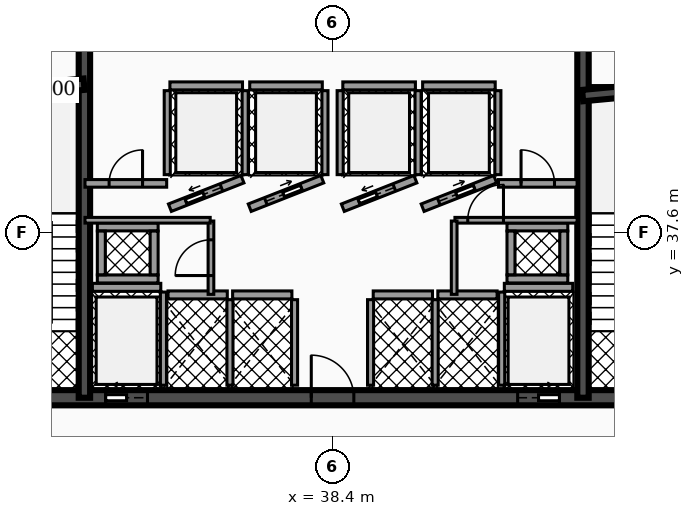
"""IFC4 building model, lengths in metres.
Left out: names, types, materials, properties, quantities, classifications, styles, units other than length and angle.
Written with IfcOpenShell. Run it as: python <this file> out.ifc"""

import sys

from ifc_helpers import new_model, si_unit, direction, frame, frame_2d, origin, place, context, subcontext, project, spatial, rectangle, extrude, element, fill, save


model = new_model("IFC4")
c1 = context("Model", 3, precision=1e-05, world=origin(), true_north=direction((0.0, 1.0)))
c2 = subcontext(c1, "Body", "Model", "MODEL_VIEW")
j1 = project(units=[si_unit("LENGTHUNIT", "METRE"), si_unit("PLANEANGLEUNIT", "RADIAN")], contexts=[c1])
p1 = place(None, origin())
s1 = spatial("IfcSite", under=j1, at=p1, CompositionType="ELEMENT")
p2 = place(p1, origin())
s2 = spatial("IfcBuilding", under=s1, at=p2, CompositionType="ELEMENT")
p3 = place(p2, frame((0.0, 0.0, 47.94)))
s3 = spatial("IfcBuildingStorey", under=s2, at=p3, CompositionType="ELEMENT", Elevation=47.94)
p4 = place(p3, frame((28.4, 33.25, 0.0), z_axis=(0.0, 0.0, 1.0), x_axis=(1.0, 0.0, 0.0)))
e1 = element("IfcWall", 1, at=p4, inside=s3, PredefinedType="SHEAR", context=c2, shape_type="SweptSolid", body=[
    extrude(rectangle(XDim=20.06, YDim=0.4, at=frame_2d((10.03, 0.0))), origin(), (0.0, 0.0, 1.0), 3.82),
])
p5 = place(p4, frame((4.03, 0.0, 0.0)))
e2 = element("IfcOpeningElement", 2, at=p5, cuts=e1, PredefinedType="OPENING", context=c2, shape_type="SweptSolid", body=[
    extrude(rectangle(XDim=1.1, YDim=2.15, at=frame_2d((0.55, 1.075))), frame((0.0, 0.21, 0.0), z_axis=(0.0, -1.0, 0.0), x_axis=(1.0, 0.0, 0.0)), (0.0, 0.0, 1.0), 0.42),
])
p6 = place(p4, frame((14.87, 0.0, 0.0)))
e3 = element("IfcOpeningElement", 3, at=p6, cuts=e1, PredefinedType="OPENING", context=c2, shape_type="SweptSolid", body=[
    extrude(rectangle(XDim=1.1, YDim=2.15, at=frame_2d((0.55, 1.075))), frame((0.0, 0.21, 0.0), z_axis=(0.0, -1.0, 0.0), x_axis=(1.0, 0.0, 0.0)), (0.0, 0.0, 1.0), 0.42),
])
p7 = place(p4, frame((1.31, 0.0, 0.0)))
e4 = element("IfcOpeningElement", 4, at=p7, cuts=e1, PredefinedType="OPENING", context=c2, shape_type="SweptSolid", body=[
    extrude(rectangle(XDim=1.1, YDim=2.2, at=frame_2d((0.55, 1.1))), frame((0.0, 0.21, 0.0), z_axis=(0.0, -1.0, 0.0), x_axis=(1.0, 0.0, 0.0)), (0.0, 0.0, 1.0), 0.42),
])
p8 = place(p4, frame((9.44, 0.0, 0.0)))
e5 = element("IfcOpeningElement", 5, at=p8, cuts=e1, PredefinedType="OPENING", context=c2, shape_type="SweptSolid", body=[
    extrude(rectangle(XDim=1.12, YDim=2.05, at=frame_2d((0.56, 1.025))), frame((0.0, 0.21, 0.0), z_axis=(0.0, -1.0, 0.0), x_axis=(1.0, 0.0, 0.0)), (0.0, 0.0, 1.0), 0.42),
])
p9 = place(p4, frame((17.65, 0.0, 0.0)))
e6 = element("IfcOpeningElement", 6, at=p9, cuts=e1, PredefinedType="OPENING", context=c2, shape_type="SweptSolid", body=[
    extrude(rectangle(XDim=1.1, YDim=2.2, at=frame_2d((0.55, 1.1))), frame((0.0, 0.21, 0.0), z_axis=(0.0, -1.0, 0.0), x_axis=(1.0, 0.0, 0.0)), (0.0, 0.0, 1.0), 0.42),
])
for number, where, z_axis, x_axis in (
    (7, (31.87, 33.25, 0.0), (0.0, 0.0, 1.0), (0.0, 1.0, 0.0)),
    (8, (44.99, 33.25, 0.0), (0.0, 0.0, 1.0), (0.0, 1.0, 0.0)),
):
    element("IfcWall", number, at=place(p3, frame(where, z_axis=z_axis, x_axis=x_axis)), inside=s3, PredefinedType="SHEAR", context=c2, shape_type="SweptSolid", body=[
        extrude(rectangle(XDim=10.2, YDim=0.3, at=frame_2d((5.1, 0.0))), origin(), (0.0, 0.0, 1.0), 3.82),
    ])
p10 = place(p3, frame((28.64, 41.2, 0.0), z_axis=(0.0, 0.0, 1.0), x_axis=(0.995687118776, 0.092774789157, 0.0)))
e9 = element("IfcWall", 9, at=p10, inside=s3, PredefinedType="SHEAR", context=c2, shape_type="SweptSolid", body=[
    extrude(rectangle(XDim=3.234, YDim=0.3, at=frame_2d((1.617, 0.0))), origin(), (0.0, 0.0, 1.0), 3.82),
])
p11 = place(p3, frame((44.98, 41.2, 0.0), z_axis=(0.0, 0.0, 1.0), x_axis=(0.995686468965, 0.09278176286, 0.0)))
e10 = element("IfcWall", 10, at=p11, inside=s3, PredefinedType="SHEAR", context=c2, shape_type="SweptSolid", body=[
    extrude(rectangle(XDim=3.234, YDim=0.3, at=frame_2d((1.617, 0.0))), origin(), (0.0, 0.0, 1.0), 3.82),
])
p12 = place(p3, frame((32.08, 36.155, 0.0), z_axis=(0.0, 0.0, 1.0), x_axis=(1.0, 0.0, 0.0)))
e11 = element("IfcWall", 11, at=p12, inside=s3, PredefinedType="SOLIDWALL", context=c2, shape_type="SweptSolid", body=[
    extrude(rectangle(XDim=1.8, YDim=0.21, at=frame_2d((0.9, 0.0))), origin(), (0.0, 0.0, 1.0), 2.792),
])
p13 = place(p3, frame((33.95, 33.58, 0.0), z_axis=(0.0, 0.0, 1.0), x_axis=(0.0, 1.0, 0.0)))
e12 = element("IfcWall", 12, at=p13, inside=s3, PredefinedType="SOLIDWALL", context=c2, shape_type="SweptSolid", body=[
    extrude(rectangle(XDim=2.45, YDim=0.16, at=frame_2d((1.225, 0.0))), origin(), (0.0, 0.0, 1.0), 2.792),
])
p14 = place(p3, frame((42.92, 36.155, 0.0), z_axis=(0.0, 0.0, 1.0), x_axis=(1.0, 0.0, 0.0)))
e13 = element("IfcWall", 13, at=p14, inside=s3, PredefinedType="SOLIDWALL", context=c2, shape_type="SweptSolid", body=[
    extrude(rectangle(XDim=1.8, YDim=0.21, at=frame_2d((0.9, 0.0))), origin(), (0.0, 0.0, 1.0), 2.792),
])
p15 = place(p3, frame((42.85, 33.58, 0.0), z_axis=(0.0, 0.0, 1.0), x_axis=(0.0, 1.0, 0.0)))
e14 = element("IfcWall", 14, at=p15, inside=s3, PredefinedType="SOLIDWALL", context=c2, shape_type="SweptSolid", body=[
    extrude(rectangle(XDim=2.45, YDim=0.16, at=frame_2d((1.225, 0.0))), origin(), (0.0, 0.0, 1.0), 2.792),
])
p16 = place(p3, frame((34.12, 38.25, 0.0), z_axis=(0.0, 0.0, 1.0), x_axis=(0.930804993012, 0.36551616241, 0.0)))
e15 = element("IfcWall", 15, at=p16, inside=s3, PredefinedType="SOLIDWALL", context=c2, shape_type="SweptSolid", body=[
    extrude(rectangle(XDim=2.052, YDim=0.21, at=frame_2d((1.026, 0.0))), origin(), (0.0, 0.0, 1.0), 2.792),
])
p17 = place(p16, frame((0.455, 0.0, 0.0)))
e16 = element("IfcOpeningElement", 16, at=p17, cuts=e15, PredefinedType="OPENING", context=c2, shape_type="SweptSolid", body=[
    extrude(rectangle(XDim=1.0, YDim=2.1, at=frame_2d((0.5, 1.05))), frame((0.0, 0.115, 0.0), z_axis=(0.0, -1.0, 0.0), x_axis=(1.0, 0.0, 0.0)), (0.0, 0.0, 1.0), 0.23),
])
p18 = place(p3, frame((34.12, 41.455, 0.0), z_axis=(0.0, 0.0, 1.0), x_axis=(1.0, 0.0, 0.0)))
e17 = element("IfcWall", 17, at=p18, inside=s3, PredefinedType="SOLIDWALL", context=c2, shape_type="SweptSolid", body=[
    extrude(rectangle(XDim=1.91, YDim=0.21, at=frame_2d((0.955, 0.0))), origin(), (0.0, 0.0, 1.0), 2.792),
])
for number, where, z_axis, x_axis in (
    (18, (34.05, 39.12, 0.0), (0.0, 0.0, 1.0), (0.0, 1.0, 0.0)),
    (19, (36.1, 39.12, 0.0), (0.0, 0.0, 1.0), (0.0, 1.0, 0.0)),
):
    element("IfcWall", number, at=place(p3, frame(where, z_axis=z_axis, x_axis=x_axis)), inside=s3, PredefinedType="SOLIDWALL", context=c2, shape_type="SweptSolid", body=[
        extrude(rectangle(XDim=2.21, YDim=0.16, at=frame_2d((1.105, 0.0))), origin(), (0.0, 0.0, 1.0), 2.792),
    ])
p19 = place(p3, frame((36.22, 38.25, 0.0), z_axis=(0.0, 0.0, 1.0), x_axis=(0.930804993012, 0.36551616241, 0.0)))
e20 = element("IfcWall", 20, at=p19, inside=s3, PredefinedType="SOLIDWALL", context=c2, shape_type="SweptSolid", body=[
    extrude(rectangle(XDim=2.052, YDim=0.21, at=frame_2d((1.026, 0.0))), origin(), (0.0, 0.0, 1.0), 2.792),
])
p20 = place(p19, frame((0.455, 0.0, 0.0)))
e21 = element("IfcOpeningElement", 21, at=p20, cuts=e20, PredefinedType="OPENING", context=c2, shape_type="SweptSolid", body=[
    extrude(rectangle(XDim=1.0, YDim=2.1, at=frame_2d((0.5, 1.05))), frame((0.0, 0.115, 0.0), z_axis=(0.0, -1.0, 0.0), x_axis=(1.0, 0.0, 0.0)), (0.0, 0.0, 1.0), 0.23),
])
p21 = place(p3, frame((36.22, 41.455, 0.0), z_axis=(0.0, 0.0, 1.0), x_axis=(1.0, 0.0, 0.0)))
e22 = element("IfcWall", 22, at=p21, inside=s3, PredefinedType="SOLIDWALL", context=c2, shape_type="SweptSolid", body=[
    extrude(rectangle(XDim=1.91, YDim=0.21, at=frame_2d((0.955, 0.0))), origin(), (0.0, 0.0, 1.0), 2.792),
])
p22 = place(p3, frame((38.2, 39.12, 0.0), z_axis=(0.0, 0.0, 1.0), x_axis=(0.0, 1.0, 0.0)))
e23 = element("IfcWall", 23, at=p22, inside=s3, PredefinedType="SOLIDWALL", context=c2, shape_type="SweptSolid", body=[
    extrude(rectangle(XDim=2.21, YDim=0.16, at=frame_2d((1.105, 0.0))), origin(), (0.0, 0.0, 1.0), 2.792),
])
p23 = place(p3, frame((38.67, 38.25, 0.0), z_axis=(0.0, 0.0, 1.0), x_axis=(0.930820886763, 0.3654756856, 0.0)))
e24 = element("IfcWall", 24, at=p23, inside=s3, PredefinedType="SOLIDWALL", context=c2, shape_type="SweptSolid", body=[
    extrude(rectangle(XDim=2.052, YDim=0.21, at=frame_2d((1.026, 0.0))), origin(), (0.0, 0.0, 1.0), 2.792),
])
p24 = place(p23, frame((0.455, 0.0, 0.0)))
e25 = element("IfcOpeningElement", 25, at=p24, cuts=e24, PredefinedType="OPENING", context=c2, shape_type="SweptSolid", body=[
    extrude(rectangle(XDim=1.0, YDim=2.1, at=frame_2d((0.5, 1.05))), frame((0.0, 0.115, 0.0), z_axis=(0.0, -1.0, 0.0), x_axis=(1.0, 0.0, 0.0)), (0.0, 0.0, 1.0), 0.23),
])
p25 = place(p3, frame((38.67, 41.455, 0.0), z_axis=(0.0, 0.0, 1.0), x_axis=(1.0, 0.0, 0.0)))
e26 = element("IfcWall", 26, at=p25, inside=s3, PredefinedType="SOLIDWALL", context=c2, shape_type="SweptSolid", body=[
    extrude(rectangle(XDim=1.91, YDim=0.21, at=frame_2d((0.955, 0.0))), origin(), (0.0, 0.0, 1.0), 2.792),
])
for number, where, z_axis, x_axis in (
    (27, (38.6, 39.12, 0.0), (0.0, 0.0, 1.0), (0.0, 1.0, 0.0)),
    (28, (40.65, 39.12, 0.0), (0.0, 0.0, 1.0), (0.0, 1.0, 0.0)),
):
    element("IfcWall", number, at=place(p3, frame(where, z_axis=z_axis, x_axis=x_axis)), inside=s3, PredefinedType="SOLIDWALL", context=c2, shape_type="SweptSolid", body=[
        extrude(rectangle(XDim=2.21, YDim=0.16, at=frame_2d((1.105, 0.0))), origin(), (0.0, 0.0, 1.0), 2.792),
    ])
p26 = place(p3, frame((40.77, 38.25, 0.0), z_axis=(0.0, 0.0, 1.0), x_axis=(0.930804993012, 0.36551616241, 0.0)))
e29 = element("IfcWall", 29, at=p26, inside=s3, PredefinedType="SOLIDWALL", context=c2, shape_type="SweptSolid", body=[
    extrude(rectangle(XDim=2.052, YDim=0.21, at=frame_2d((1.026, 0.0))), origin(), (0.0, 0.0, 1.0), 2.792),
])
p27 = place(p26, frame((0.455, 0.0, 0.0)))
e30 = element("IfcOpeningElement", 30, at=p27, cuts=e29, PredefinedType="OPENING", context=c2, shape_type="SweptSolid", body=[
    extrude(rectangle(XDim=1.0, YDim=2.1, at=frame_2d((0.5, 1.05))), frame((0.0, 0.115, 0.0), z_axis=(0.0, -1.0, 0.0), x_axis=(1.0, 0.0, 0.0)), (0.0, 0.0, 1.0), 0.23),
])
p28 = place(p3, frame((40.77, 41.455, 0.0), z_axis=(0.0, 0.0, 1.0), x_axis=(1.0, 0.0, 0.0)))
e31 = element("IfcWall", 31, at=p28, inside=s3, PredefinedType="SOLIDWALL", context=c2, shape_type="SweptSolid", body=[
    extrude(rectangle(XDim=1.91, YDim=0.21, at=frame_2d((0.955, 0.0))), origin(), (0.0, 0.0, 1.0), 2.792),
])
p29 = place(p3, frame((42.75, 39.12, 0.0), z_axis=(0.0, 0.0, 1.0), x_axis=(0.0, 1.0, 0.0)))
e32 = element("IfcWall", 32, at=p29, inside=s3, PredefinedType="SOLIDWALL", context=c2, shape_type="SweptSolid", body=[
    extrude(rectangle(XDim=2.21, YDim=0.16, at=frame_2d((1.105, 0.0))), origin(), (0.0, 0.0, 1.0), 2.792),
])
p30 = place(p3, frame((34.07, 35.955, 0.0), z_axis=(0.0, 0.0, 1.0), x_axis=(1.0, 0.0, 0.0)))
e33 = element("IfcWall", 33, at=p30, inside=s3, PredefinedType="SOLIDWALL", context=c2, shape_type="SweptSolid", body=[
    extrude(rectangle(XDim=1.56, YDim=0.21, at=frame_2d((0.78, 0.0))), origin(), (0.0, 0.0, 1.0), 2.792),
])
p31 = place(p3, frame((35.7, 33.58, 0.0), z_axis=(0.0, 0.0, 1.0), x_axis=(0.0, 1.0, 0.0)))
e34 = element("IfcWall", 34, at=p31, inside=s3, PredefinedType="SOLIDWALL", context=c2, shape_type="SweptSolid", body=[
    extrude(rectangle(XDim=2.25, YDim=0.16, at=frame_2d((1.125, 0.0))), origin(), (0.0, 0.0, 1.0), 2.792),
])
p32 = place(p3, frame((35.77, 35.955, 0.0), z_axis=(0.0, 0.0, 1.0), x_axis=(1.0, 0.0, 0.0)))
e35 = element("IfcWall", 35, at=p32, inside=s3, PredefinedType="SOLIDWALL", context=c2, shape_type="SweptSolid", body=[
    extrude(rectangle(XDim=1.56, YDim=0.21, at=frame_2d((0.78, 0.0))), origin(), (0.0, 0.0, 1.0), 2.792),
])
p33 = place(p3, frame((37.4, 33.58, 0.0), z_axis=(0.0, 0.0, 1.0), x_axis=(0.0, 1.0, 0.0)))
e36 = element("IfcWall", 36, at=p33, inside=s3, PredefinedType="SOLIDWALL", context=c2, shape_type="SweptSolid", body=[
    extrude(rectangle(XDim=2.25, YDim=0.16, at=frame_2d((1.125, 0.0))), origin(), (0.0, 0.0, 1.0), 2.792),
])
p34 = place(p3, frame((39.47, 35.955, 0.0), z_axis=(0.0, 0.0, 1.0), x_axis=(1.0, 0.0, 0.0)))
e37 = element("IfcWall", 37, at=p34, inside=s3, PredefinedType="SOLIDWALL", context=c2, shape_type="SweptSolid", body=[
    extrude(rectangle(XDim=1.56, YDim=0.21, at=frame_2d((0.78, 0.0))), origin(), (0.0, 0.0, 1.0), 2.792),
])
for number, where, z_axis, x_axis in (
    (38, (39.4, 33.58, 0.0), (0.0, 0.0, 1.0), (0.0, 1.0, 0.0)),
    (39, (41.1, 33.58, 0.0), (0.0, 0.0, 1.0), (0.0, 1.0, 0.0)),
):
    element("IfcWall", number, at=place(p3, frame(where, z_axis=z_axis, x_axis=x_axis)), inside=s3, PredefinedType="SOLIDWALL", context=c2, shape_type="SweptSolid", body=[
        extrude(rectangle(XDim=2.25, YDim=0.16, at=frame_2d((1.125, 0.0))), origin(), (0.0, 0.0, 1.0), 2.792),
    ])
p35 = place(p3, frame((41.17, 35.955, 0.0), z_axis=(0.0, 0.0, 1.0), x_axis=(1.0, 0.0, 0.0)))
e40 = element("IfcWall", 40, at=p35, inside=s3, PredefinedType="SOLIDWALL", context=c2, shape_type="SweptSolid", body=[
    extrude(rectangle(XDim=1.56, YDim=0.21, at=frame_2d((0.78, 0.0))), origin(), (0.0, 0.0, 1.0), 2.792),
])
for number, where, z_axis, x_axis in (
    (41, (32.21, 36.375, 0.0), (0.0, 0.0, 1.0), (1.0, 0.0, 0.0)),
    (42, (32.21, 37.745, 0.0), (0.0, 0.0, 1.0), (1.0, 0.0, 0.0)),
):
    element("IfcWall", number, at=place(p3, frame(where, z_axis=z_axis, x_axis=x_axis)), inside=s3, PredefinedType="SOLIDWALL", context=c2, shape_type="SweptSolid", body=[
        extrude(rectangle(XDim=1.6, YDim=0.21, at=frame_2d((0.8, 0.0))), origin(), (0.0, 0.0, 1.0), 3.82),
    ])
for number, where, z_axis, x_axis in (
    (43, (32.315, 36.485, 0.0), (0.0, 0.0, 1.0), (0.0, 1.0, 0.0)),
    (44, (33.705, 36.485, 0.0), (0.0, 0.0, 1.0), (0.0, 1.0, 0.0)),
):
    element("IfcWall", number, at=place(p3, frame(where, z_axis=z_axis, x_axis=x_axis)), inside=s3, PredefinedType="SOLIDWALL", context=c2, shape_type="SweptSolid", body=[
        extrude(rectangle(XDim=1.15, YDim=0.21, at=frame_2d((0.575, 0.0))), origin(), (0.0, 0.0, 1.0), 3.82),
    ])
for number, where, z_axis, x_axis in (
    (45, (42.99, 36.375, 0.0), (0.0, 0.0, 1.0), (1.0, 0.0, 0.0)),
    (46, (42.99, 37.745, 0.0), (0.0, 0.0, 1.0), (1.0, 0.0, 0.0)),
):
    element("IfcWall", number, at=place(p3, frame(where, z_axis=z_axis, x_axis=x_axis)), inside=s3, PredefinedType="SOLIDWALL", context=c2, shape_type="SweptSolid", body=[
        extrude(rectangle(XDim=1.6, YDim=0.21, at=frame_2d((0.8, 0.0))), origin(), (0.0, 0.0, 1.0), 3.82),
    ])
for number, where, z_axis, x_axis in (
    (47, (43.095, 36.485, 0.0), (0.0, 0.0, 1.0), (0.0, 1.0, 0.0)),
    (48, (44.485, 36.485, 0.0), (0.0, 0.0, 1.0), (0.0, 1.0, 0.0)),
):
    element("IfcWall", number, at=place(p3, frame(where, z_axis=z_axis, x_axis=x_axis)), inside=s3, PredefinedType="SOLIDWALL", context=c2, shape_type="SweptSolid", body=[
        extrude(rectangle(XDim=1.15, YDim=0.21, at=frame_2d((0.575, 0.0))), origin(), (0.0, 0.0, 1.0), 3.82),
    ])
p36 = place(p3, frame((35.2, 35.97, 0.0), z_axis=(0.0, 0.0, 1.0), x_axis=(0.0, 1.0, 0.0)))
e49 = element("IfcWall", 49, at=p36, inside=s3, PredefinedType="PARTITIONING", context=c2, shape_type="SweptSolid", body=[
    extrude(rectangle(XDim=1.93, YDim=0.15, at=frame_2d((0.965, 0.0))), origin(), (0.0, 0.0, 1.0), 2.777),
])
p37 = place(p36, frame((0.495, 0.0, 0.0)))
e50 = element("IfcOpeningElement", 50, at=p37, cuts=e49, PredefinedType="OPENING", context=c2, shape_type="SweptSolid", body=[
    extrude(rectangle(XDim=0.94, YDim=2.05, at=frame_2d((0.47, 1.025))), frame((0.0, 0.085, 0.0), z_axis=(0.0, -1.0, 0.0), x_axis=(1.0, 0.0, 0.0)), (0.0, 0.0, 1.0), 0.17),
])
p38 = place(p3, frame((31.885, 37.92, 0.0), z_axis=(0.0, 0.0, 1.0), x_axis=(1.0, 0.0, 0.0)))
e51 = element("IfcWall", 51, at=p38, inside=s3, PredefinedType="PARTITIONING", context=c2, shape_type="SweptSolid", body=[
    extrude(rectangle(XDim=3.295, YDim=0.15, at=frame_2d((1.647, 0.0))), origin(), (0.0, 0.0, 1.0), 2.777),
])
p39 = place(p3, frame((31.885, 38.89, 0.0), z_axis=(0.0, 0.0, 1.0), x_axis=(1.0, 0.0, 0.0)))
e52 = element("IfcWall", 52, at=p39, inside=s3, PredefinedType="PARTITIONING", context=c2, shape_type="SweptSolid", body=[
    extrude(rectangle(XDim=2.15, YDim=0.2, at=frame_2d((1.075, 0.0))), origin(), (0.0, 0.0, 1.0), 2.777),
])
p40 = place(p39, frame((0.635, 0.0, 0.0)))
e53 = element("IfcOpeningElement", 53, at=p40, cuts=e52, PredefinedType="OPENING", context=c2, shape_type="SweptSolid", body=[
    extrude(rectangle(XDim=0.88, YDim=2.05, at=frame_2d((0.44, 1.025))), frame((0.0, 0.11, 0.0), z_axis=(0.0, -1.0, 0.0), x_axis=(1.0, 0.0, 0.0)), (0.0, 0.0, 1.0), 0.22),
])
p41 = place(p3, frame((42.765, 38.89, 0.0), z_axis=(0.0, 0.0, 1.0), x_axis=(1.0, 0.0, 0.0)))
e54 = element("IfcWall", 54, at=p41, inside=s3, PredefinedType="PARTITIONING", context=c2, shape_type="SweptSolid", body=[
    extrude(rectangle(XDim=2.07, YDim=0.2, at=frame_2d((1.035, 0.0))), origin(), (0.0, 0.0, 1.0), 2.777),
])
p42 = place(p41, frame((0.595, 0.0, 0.0)))
e55 = element("IfcOpeningElement", 55, at=p42, cuts=e54, PredefinedType="OPENING", context=c2, shape_type="SweptSolid", body=[
    extrude(rectangle(XDim=0.88, YDim=2.05, at=frame_2d((0.44, 1.025))), frame((0.0, 0.11, 0.0), z_axis=(0.0, -1.0, 0.0), x_axis=(1.0, 0.0, 0.0)), (0.0, 0.0, 1.0), 0.22),
])
p43 = place(p3, frame((41.62, 37.92, 0.0), z_axis=(0.0, 0.0, 1.0), x_axis=(1.0, 0.0, 0.0)))
e56 = element("IfcWall", 56, at=p43, inside=s3, PredefinedType="PARTITIONING", context=c2, shape_type="SweptSolid", body=[
    extrude(rectangle(XDim=3.215, YDim=0.15, at=frame_2d((1.607, 0.0))), origin(), (0.0, 0.0, 1.0), 2.777),
])
p44 = place(p43, frame((0.337, 0.0, 0.0)))
e57 = element("IfcOpeningElement", 57, at=p44, cuts=e56, PredefinedType="OPENING", context=c2, shape_type="SweptSolid", body=[
    extrude(rectangle(XDim=0.94, YDim=2.05, at=frame_2d((0.47, 1.025))), frame((0.0, 0.085, 0.0), z_axis=(0.0, -1.0, 0.0), x_axis=(1.0, 0.0, 0.0)), (0.0, 0.0, 1.0), 0.17),
])
p45 = place(p3, frame((41.6, 35.97, 0.0), z_axis=(0.0, 0.0, 1.0), x_axis=(0.0, 1.0, 0.0)))
e58 = element("IfcWall", 58, at=p45, inside=s3, PredefinedType="PARTITIONING", context=c2, shape_type="SweptSolid", body=[
    extrude(rectangle(XDim=1.93, YDim=0.15, at=frame_2d((0.965, 0.0))), origin(), (0.0, 0.0, 1.0), 2.777),
])
p46 = place(p5, origin())
e59 = element("IfcDoor", 59, at=p46, inside=s3, OperationType="SLIDING_TO_LEFT", PredefinedType="DOOR", context=c2, shape_type="SweptSolid", body=[
    extrude(rectangle(XDim=1.1, YDim=2.15, at=frame_2d((0.55, 1.075))), frame((0.0, 0.025, 0.0), z_axis=(0.0, -1.0, 0.0), x_axis=(1.0, 0.0, 0.0)), (0.0, 0.0, 1.0), 0.05),
])
fill(e2, e59)
p47 = place(p6, origin())
e60 = element("IfcDoor", 60, at=p47, inside=s3, OperationType="SLIDING_TO_RIGHT", PredefinedType="DOOR", context=c2, shape_type="SweptSolid", body=[
    extrude(rectangle(XDim=1.1, YDim=2.15, at=frame_2d((0.55, 1.075))), frame((0.0, 0.025, 0.0), z_axis=(0.0, -1.0, 0.0), x_axis=(1.0, 0.0, 0.0)), (0.0, 0.0, 1.0), 0.05),
])
fill(e3, e60)
p48 = place(p17, origin())
e61 = element("IfcDoor", 61, at=p48, inside=s3, OperationType="SLIDING_TO_LEFT", PredefinedType="DOOR", context=c2, shape_type="SweptSolid", body=[
    extrude(rectangle(XDim=1.0, YDim=2.1, at=frame_2d((0.5, 1.05))), frame((0.0, 0.025, 0.0), z_axis=(0.0, -1.0, 0.0), x_axis=(1.0, 0.0, 0.0)), (0.0, 0.0, 1.0), 0.05),
])
fill(e16, e61)
p49 = place(p20, origin())
e62 = element("IfcDoor", 62, at=p49, inside=s3, OperationType="SLIDING_TO_RIGHT", PredefinedType="DOOR", context=c2, shape_type="SweptSolid", body=[
    extrude(rectangle(XDim=1.0, YDim=2.1, at=frame_2d((0.5, 1.05))), frame((0.0, 0.025, 0.0), z_axis=(0.0, -1.0, 0.0), x_axis=(1.0, 0.0, 0.0)), (0.0, 0.0, 1.0), 0.05),
])
fill(e21, e62)
p50 = place(p24, origin())
e63 = element("IfcDoor", 63, at=p50, inside=s3, OperationType="SLIDING_TO_LEFT", PredefinedType="DOOR", context=c2, shape_type="SweptSolid", body=[
    extrude(rectangle(XDim=1.0, YDim=2.1, at=frame_2d((0.5, 1.05))), frame((0.0, 0.025, 0.0), z_axis=(0.0, -1.0, 0.0), x_axis=(1.0, 0.0, 0.0)), (0.0, 0.0, 1.0), 0.05),
])
fill(e25, e63)
p51 = place(p27, origin())
e64 = element("IfcDoor", 64, at=p51, inside=s3, OperationType="SLIDING_TO_RIGHT", PredefinedType="DOOR", context=c2, shape_type="SweptSolid", body=[
    extrude(rectangle(XDim=1.0, YDim=2.1, at=frame_2d((0.5, 1.05))), frame((0.0, 0.025, 0.0), z_axis=(0.0, -1.0, 0.0), x_axis=(1.0, 0.0, 0.0)), (0.0, 0.0, 1.0), 0.05),
])
fill(e30, e64)
p52 = place(p8, origin())
e65 = element("IfcDoor", 65, at=p52, inside=s3, OperationType="SINGLE_SWING_LEFT", PredefinedType="DOOR", context=c2, shape_type="SweptSolid", body=[
    extrude(rectangle(XDim=1.12, YDim=2.05, at=frame_2d((0.56, 1.025))), frame((0.0, 0.025, 0.0), z_axis=(0.0, -1.0, 0.0), x_axis=(1.0, 0.0, 0.0)), (0.0, 0.0, 1.0), 0.05),
])
fill(e5, e65)
p53 = place(p37, origin())
e66 = element("IfcDoor", 66, at=p53, inside=s3, OperationType="SINGLE_SWING_LEFT", PredefinedType="DOOR", context=c2, shape_type="SweptSolid", body=[
    extrude(rectangle(XDim=0.94, YDim=2.05, at=frame_2d((0.47, 1.025))), frame((0.0, 0.025, 0.0), z_axis=(0.0, -1.0, 0.0), x_axis=(1.0, 0.0, 0.0)), (0.0, 0.0, 1.0), 0.05),
])
fill(e50, e66)
p54 = place(p40, origin())
e67 = element("IfcDoor", 67, at=p54, inside=s3, OperationType="SINGLE_SWING_RIGHT", PredefinedType="DOOR", context=c2, shape_type="SweptSolid", body=[
    extrude(rectangle(XDim=0.88, YDim=2.05, at=frame_2d((0.44, 1.025))), frame((0.0, 0.025, 0.0), z_axis=(0.0, -1.0, 0.0), x_axis=(1.0, 0.0, 0.0)), (0.0, 0.0, 1.0), 0.05),
])
fill(e53, e67)
p55 = place(p42, origin())
e68 = element("IfcDoor", 68, at=p55, inside=s3, OperationType="SINGLE_SWING_LEFT", PredefinedType="DOOR", context=c2, shape_type="SweptSolid", body=[
    extrude(rectangle(XDim=0.88, YDim=2.05, at=frame_2d((0.44, 1.025))), frame((0.0, 0.025, 0.0), z_axis=(0.0, -1.0, 0.0), x_axis=(1.0, 0.0, 0.0)), (0.0, 0.0, 1.0), 0.05),
])
fill(e55, e68)
p56 = place(p44, origin())
e69 = element("IfcDoor", 69, at=p56, inside=s3, OperationType="SINGLE_SWING_RIGHT", PredefinedType="DOOR", context=c2, shape_type="SweptSolid", body=[
    extrude(rectangle(XDim=0.94, YDim=2.05, at=frame_2d((0.47, 1.025))), frame((0.0, 0.025, 0.0), z_axis=(0.0, -1.0, 0.0), x_axis=(1.0, 0.0, 0.0)), (0.0, 0.0, 1.0), 0.05),
])
fill(e57, e69)
save(model, sys.argv[1])
